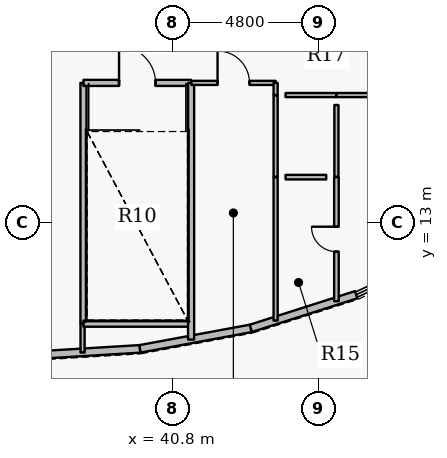
"""IFC4 building model, lengths in metres.
Left out: names, types, materials, properties, quantities, classifications, styles, units other than length and angle.
Written with IfcOpenShell. Run it as: python <this file> out.ifc"""

import sys

from ifc_helpers import new_model, si_unit, direction, frame, frame_2d, origin, origin_2d, place, context, subcontext, project, spatial, rectangle, extrude, source, transform, mapped, element, fill, save


model = new_model("IFC4")
c1 = context("Model", 3, precision=1e-05, world=origin(), true_north=direction((0.0, 1.0)))
c2 = subcontext(c1, "Body", "Model", "MODEL_VIEW")
j1 = project(units=[si_unit("LENGTHUNIT", "METRE"), si_unit("PLANEANGLEUNIT", "RADIAN")], contexts=[c1])
p1 = place(None, origin())
s1 = spatial("IfcSite", under=j1, at=p1, CompositionType="ELEMENT")
p2 = place(p1, origin())
s2 = spatial("IfcBuilding", under=s1, at=p2, CompositionType="ELEMENT")
p3 = place(p2, origin())
s3 = spatial("IfcBuildingStorey", under=s2, at=p3, CompositionType="ELEMENT", Elevation=0.0)
p4 = place(p3, frame((39.739, 8.852, 0.0), z_axis=(0.0, 0.0, 1.0), x_axis=(-0.99816551411, -0.060544251933, 0.0)))
e1 = element("IfcWall", 1, at=p4, inside=s3, PredefinedType="SOLIDWALL", context=c2, shape_type="SweptSolid", body=[
    extrude(rectangle(XDim=3.746, YDim=0.25, at=frame_2d((1.873, 0.0))), origin(), (0.0, 0.0, 1.0), 4.885),
])
p5 = place(p3, frame((43.386, 9.527, 0.0), z_axis=(0.0, 0.0, 1.0), x_axis=(-0.983306878602, -0.181954891374, 0.0)))
e2 = element("IfcWall", 2, at=p5, inside=s3, PredefinedType="SOLIDWALL", context=c2, shape_type="SweptSolid", body=[
    extrude(rectangle(XDim=3.709, YDim=0.25, at=frame_2d((1.854, 0.0))), origin(), (0.0, 0.0, 1.0), 4.885),
])
p6 = place(p3, frame((46.85, 10.633, 0.0), z_axis=(0.0, 0.0, 1.0), x_axis=(-0.952608721119, -0.304198330777, 0.0)))
e3 = element("IfcWall", 3, at=p6, inside=s3, PredefinedType="SOLIDWALL", context=c2, shape_type="SweptSolid", body=[
    extrude(rectangle(XDim=3.636, YDim=0.25, at=frame_2d((1.818, 0.0))), origin(), (0.0, 0.0, 1.0), 4.885),
])
p7 = place(p3, frame((37.85, 8.732, 0.0), z_axis=(0.0, 0.0, 1.0), x_axis=(0.0, 1.0, 0.0)))
e4 = element("IfcWall", 4, at=p7, inside=s3, PredefinedType="PARTITIONING", context=c2, shape_type="SweptSolid", body=[
    extrude(rectangle(XDim=0.948, YDim=0.135, at=frame_2d((0.474, 0.0))), origin(), (0.0, 0.0, 1.0), 5.7),
])
p8 = place(p3, frame((37.88, 9.69, 0.0), z_axis=(0.0, 0.0, 1.0), x_axis=(0.0, 1.0, 0.0)))
e5 = element("IfcWall", 5, at=p8, inside=s3, PredefinedType="PARTITIONING", context=c2, shape_type="SweptSolid", body=[
    extrude(rectangle(XDim=7.91, YDim=0.2, at=frame_2d((3.955, 0.0))), origin(), (0.0, 0.0, 1.0), 5.7),
])
p9 = place(p3, frame((37.88, 9.68, 0.0), z_axis=(0.0, 0.0, 1.0), x_axis=(1.0, 0.0, 0.0)))
e6 = element("IfcWall", 6, at=p9, inside=s3, PredefinedType="PARTITIONING", context=c2, shape_type="SweptSolid", body=[
    extrude(rectangle(XDim=3.54, YDim=0.2, at=frame_2d((1.77, 0.0))), origin(), (0.0, 0.0, 1.0), 5.7),
])
p10 = place(p3, frame((37.88, 17.6, 0.0), z_axis=(0.0, 0.0, 1.0), x_axis=(1.0, 0.0, 0.0)))
e7 = element("IfcWall", 7, at=p10, inside=s3, PredefinedType="PARTITIONING", context=c2, shape_type="SweptSolid", body=[
    extrude(rectangle(XDim=3.54, YDim=0.2, at=frame_2d((1.77, 0.0))), origin(), (0.0, 0.0, 1.0), 4.885),
])
p11 = place(p10, frame((1.17, 0.0, 0.0)))
e8 = element("IfcOpeningElement", 8, at=p11, cuts=e7, PredefinedType="OPENING", context=c2, shape_type="SweptSolid", body=[
    extrude(rectangle(XDim=1.2, YDim=2.15, at=origin_2d()), frame((0.6, 0.11, 1.075), z_axis=(0.0, -1.0, 0.0), x_axis=(1.0, 0.0, 0.0)), (0.0, 0.0, 1.0), 0.22),
])
p12 = place(p3, frame((41.42, 9.158, 0.0), z_axis=(0.0, 0.0, 1.0), x_axis=(0.0, 1.0, 0.0)))
e9 = element("IfcWall", 9, at=p12, inside=s3, PredefinedType="PARTITIONING", context=c2, shape_type="SweptSolid", body=[
    extrude(rectangle(XDim=8.442, YDim=0.2, at=frame_2d((4.221, 0.0))), origin(), (0.0, 0.0, 1.0), 4.885),
])
p13 = place(p3, frame((41.43, 17.6, 0.0), z_axis=(0.0, 0.0, 1.0), x_axis=(1.0, 0.0, 0.0)))
e10 = element("IfcWall", 10, at=p13, inside=s3, PredefinedType="PARTITIONING", context=c2, shape_type="SweptSolid", body=[
    extrude(rectangle(XDim=2.77, YDim=0.135, at=frame_2d((1.385, 0.0))), origin(), (0.0, 0.0, 1.0), 5.7),
])
p14 = place(p13, frame((0.86, 0.0, 0.0)))
e11 = element("IfcOpeningElement", 11, at=p14, cuts=e10, PredefinedType="OPENING", context=c2, shape_type="SweptSolid", body=[
    extrude(rectangle(XDim=1.05, YDim=2.15, at=origin_2d()), frame((0.525, 0.078, 1.075), z_axis=(0.0, -1.0, 0.0), x_axis=(1.0, 0.0, 0.0)), (0.0, 0.0, 1.0), 0.155),
])
p15 = place(p3, frame((44.2, 9.781, 0.0), z_axis=(0.0, 0.0, 1.0), x_axis=(0.0, 1.0, 0.0)))
e12 = element("IfcWall", 12, at=p15, inside=s3, PredefinedType="PARTITIONING", context=c2, shape_type="SweptSolid", body=[
    extrude(rectangle(XDim=4.719, YDim=0.135, at=frame_2d((2.359, 0.0))), origin(), (0.0, 0.0, 1.0), 5.7),
])
p16 = place(p3, frame((44.2, 17.2, 0.0), z_axis=(0.0, 0.0, 1.0), x_axis=(0.0, 1.0, 0.0)))
e13 = element("IfcWall", 13, at=p16, inside=s3, PredefinedType="PARTITIONING", context=c2, shape_type="SweptSolid", body=[
    extrude(rectangle(XDim=0.4, YDim=0.135, at=frame_2d((0.2, 0.0))), origin(), (0.0, 0.0, 1.0), 5.7),
])
p17 = place(p3, frame((46.2, 10.42, 0.0), z_axis=(0.0, 0.0, 1.0), x_axis=(0.0, 1.0, 0.0)))
e14 = element("IfcWall", 14, at=p17, inside=s3, PredefinedType="PARTITIONING", context=c2, shape_type="SweptSolid", body=[
    extrude(rectangle(XDim=4.08, YDim=0.15, at=frame_2d((2.04, 0.0))), origin(), (0.0, 0.0, 1.0), 5.7),
])
p18 = place(p17, frame((1.63, 0.0, 0.0)))
e15 = element("IfcOpeningElement", 15, at=p18, cuts=e14, PredefinedType="OPENING", context=c2, shape_type="SweptSolid", body=[
    extrude(rectangle(XDim=0.82, YDim=2.1, at=origin_2d()), frame((0.41, 0.085, 1.05), z_axis=(0.0, -1.0, 0.0), x_axis=(1.0, 0.0, 0.0)), (0.0, 0.0, 1.0), 0.17),
])
p19 = place(p3, frame((46.2, 17.2, 0.0), z_axis=(0.0, 0.0, 1.0), x_axis=(1.0, 0.0, 0.0)))
e16 = element("IfcWall", 16, at=p19, inside=s3, PredefinedType="PARTITIONING", context=c2, shape_type="SweptSolid", body=[
    extrude(rectangle(XDim=2.8, YDim=0.135, at=frame_2d((1.4, 0.0))), origin(), (0.0, 0.0, 1.0), 4.885),
])
p20 = place(p3, frame((44.2, 17.19, 0.0), z_axis=(0.0, 0.0, 1.0), x_axis=(0.0, -1.0, 0.0)))
e17 = element("IfcWall", 17, at=p20, inside=s3, PredefinedType="PARTITIONING", context=c2, shape_type="SweptSolid", body=[
    extrude(rectangle(XDim=2.68, YDim=0.135, at=frame_2d((1.34, 0.0))), origin(), (0.0, 0.0, 1.0), 5.7),
])
p21 = place(p3, frame((46.19, 17.2, 0.0), z_axis=(0.0, 0.0, 1.0), x_axis=(-1.0, 0.0, 0.0)))
e18 = element("IfcWall", 18, at=p21, inside=s3, PredefinedType="PARTITIONING", context=c2, shape_type="SweptSolid", body=[
    extrude(rectangle(XDim=1.662, YDim=0.135, at=frame_2d((0.831, 0.0))), origin(), (0.0, 0.0, 1.0), 5.7),
])
p22 = place(p3, frame((44.528, 14.5, 0.0), z_axis=(0.0, 0.0, 1.0), x_axis=(1.0, 0.0, 0.0)))
e19 = element("IfcWall", 19, at=p22, inside=s3, PredefinedType="PARTITIONING", context=c2, shape_type="SweptSolid", body=[
    extrude(rectangle(XDim=1.337, YDim=0.15, at=frame_2d((0.669, 0.0))), origin(), (0.0, 0.0, 1.0), 5.7),
])
p23 = place(p3, frame((46.2, 14.51, 0.0), z_axis=(0.0, 0.0, 1.0), x_axis=(0.0, 1.0, 0.0)))
e20 = element("IfcWall", 20, at=p23, inside=s3, PredefinedType="PARTITIONING", context=c2, shape_type="SweptSolid", body=[
    extrude(rectangle(XDim=2.363, YDim=0.135, at=frame_2d((1.181, 0.0))), origin(), (0.0, 0.0, 1.0), 5.7),
])
m1 = source(origin(), c2, "Body", "SweptSolid", [
    extrude(rectangle(XDim=1.2, YDim=2.15, at=origin_2d()), frame((0.6, 0.025, 1.075), z_axis=(0.0, -1.0, 0.0), x_axis=(1.0, 0.0, 0.0)), (0.0, 0.0, 1.0), 0.05),
])
p24 = place(p11, origin())
e21 = element("IfcDoor", 21, at=p24, inside=s3, OperationType="SINGLE_SWING_LEFT", PredefinedType="DOOR", context=c2, shape_type="MappedRepresentation", body=[
    mapped(m1, transform((0.0, 0.0, 0.0), x_axis=(1.0, 0.0, 0.0), y_axis=(0.0, 1.0, 0.0), z_axis=(0.0, 0.0, 1.0), scale=1.0)),
])
fill(e8, e21)
m2 = source(origin(), c2, "Body", "SweptSolid", [
    extrude(rectangle(XDim=1.05, YDim=2.15, at=origin_2d()), frame((0.525, 0.025, 1.075), z_axis=(0.0, -1.0, 0.0), x_axis=(1.0, 0.0, 0.0)), (0.0, 0.0, 1.0), 0.05),
])
p25 = place(p14, origin())
e22 = element("IfcDoor", 22, at=p25, inside=s3, OperationType="SINGLE_SWING_LEFT", PredefinedType="DOOR", context=c2, shape_type="MappedRepresentation", body=[
    mapped(m2, transform((0.0, 0.0, 0.0), x_axis=(1.0, 0.0, 0.0), y_axis=(0.0, 1.0, 0.0), z_axis=(0.0, 0.0, 1.0), scale=1.0)),
])
fill(e11, e22)
m3 = source(origin(), c2, "Body", "SweptSolid", [
    extrude(rectangle(XDim=0.82, YDim=2.1, at=origin_2d()), frame((0.41, 0.025, 1.05), z_axis=(0.0, -1.0, 0.0), x_axis=(1.0, 0.0, 0.0)), (0.0, 0.0, 1.0), 0.05),
])
p26 = place(p18, origin())
e23 = element("IfcDoor", 23, at=p26, inside=s3, OperationType="SINGLE_SWING_RIGHT", PredefinedType="DOOR", context=c2, shape_type="MappedRepresentation", body=[
    mapped(m3, transform((0.0, 0.0, 0.0), x_axis=(1.0, 0.0, 0.0), y_axis=(0.0, 1.0, 0.0), z_axis=(0.0, 0.0, 1.0), scale=1.0)),
])
fill(e15, e23)
save(model, sys.argv[1])
